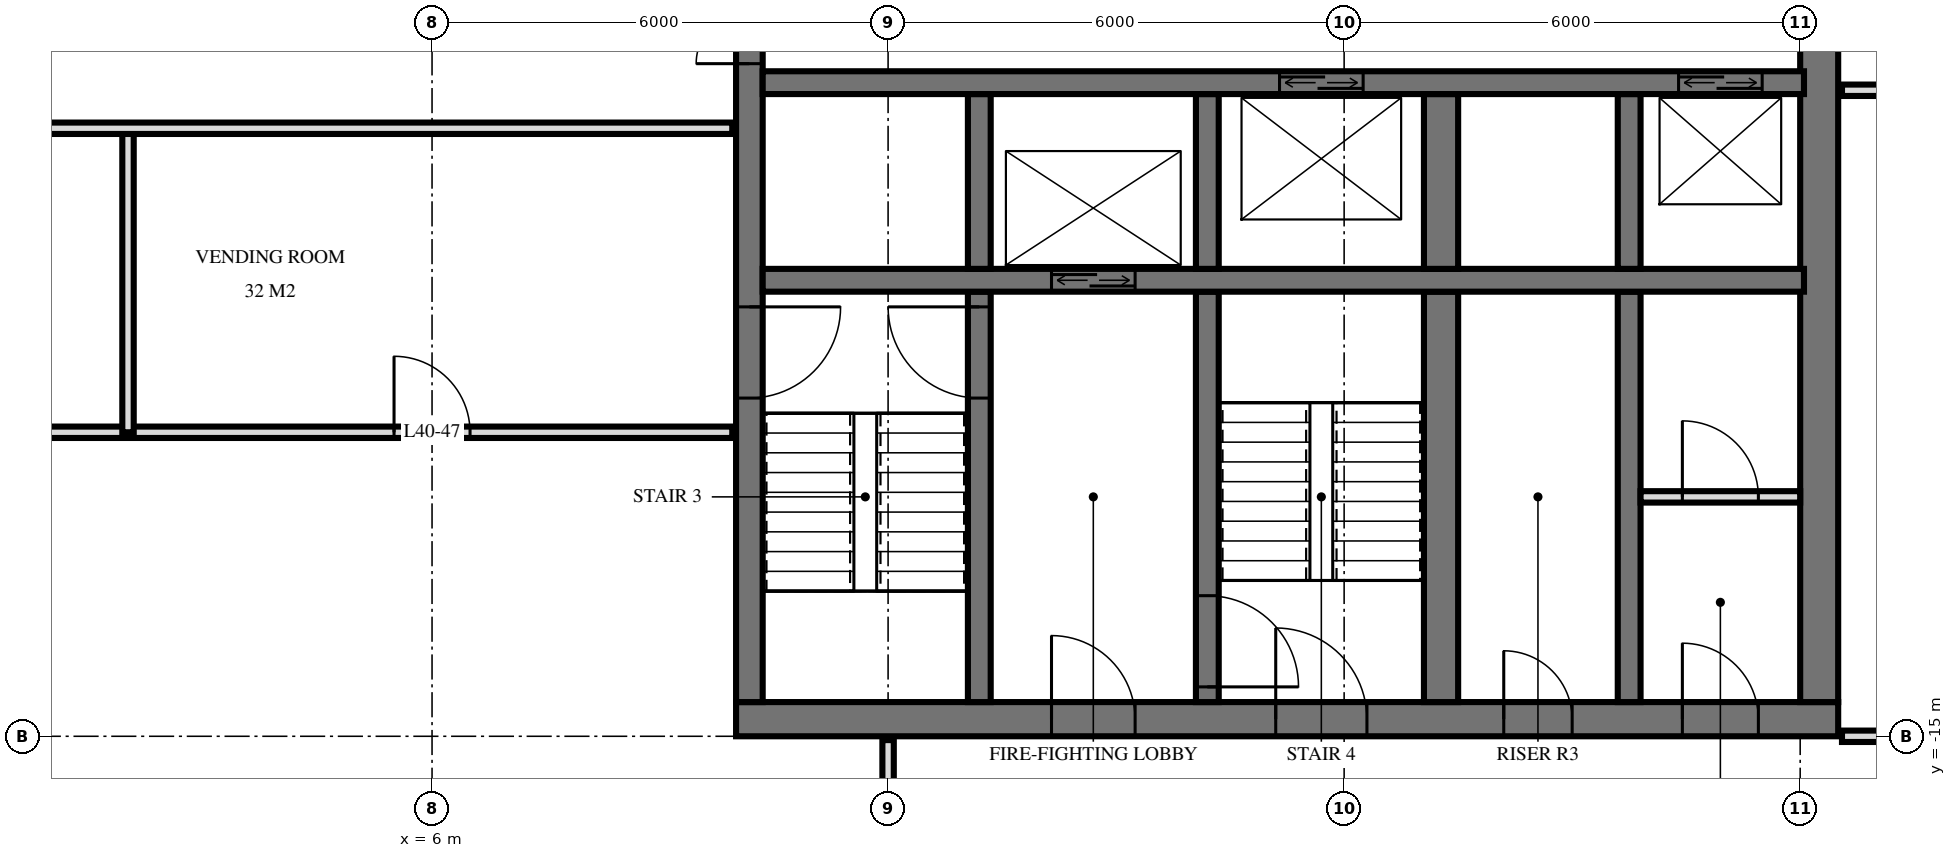
"""IFC4 building model, lengths in metres.
Left out: names, types, materials, properties, quantities, classifications, styles, units other than length and angle.
Written with IfcOpenShell. Run it as: python <this file> out.ifc"""

import sys

from ifc_helpers import new_model, si_unit, direction, frame, frame_2d, origin, place, context, subcontext, project, spatial, rectangle, extrude, element, fill, save


model = new_model("IFC4")
c1 = context("Model", 3, precision=1e-05, world=origin(), true_north=direction((0.0, 1.0)))
c2 = subcontext(c1, "Body", "Model", "MODEL_VIEW")
j1 = project(units=[si_unit("LENGTHUNIT", "METRE"), si_unit("PLANEANGLEUNIT", "RADIAN")], contexts=[c1])
p1 = place(None, origin())
s1 = spatial("IfcSite", under=j1, at=p1, CompositionType="ELEMENT")
p2 = place(p1, origin())
s2 = spatial("IfcBuilding", under=s1, at=p2, CompositionType="ELEMENT")
p3 = place(p2, frame((0.0, 0.0, 156.0)))
s3 = spatial("IfcBuildingStorey", under=s2, at=p3, CompositionType="ELEMENT", Elevation=156.0)
p4 = place(p3, frame((10.0, -14.775, 0.0), z_axis=(0.0, 0.0, 1.0), x_axis=(1.0, 0.0, 0.0)))
e1 = element("IfcWall", 1, at=p4, inside=s3, PredefinedType="SHEAR", context=c2, shape_type="SweptSolid", body=[
    extrude(rectangle(XDim=14.5, YDim=0.45, at=frame_2d((7.25, 0.0))), origin(), (0.0, 0.0, 1.0), 3.6),
])
p5 = place(p4, frame((7.1, 0.0, 0.0)))
e2 = element("IfcOpeningElement", 2, at=p5, cuts=e1, PredefinedType="OPENING", context=c2, shape_type="SweptSolid", body=[
    extrude(rectangle(XDim=1.2, YDim=2.1, at=frame_2d((0.6, 1.05))), frame((0.0, 0.235, 0.0), z_axis=(0.0, -1.0, 0.0), x_axis=(1.0, 0.0, 0.0)), (0.0, 0.0, 1.0), 0.47),
])
p6 = place(p4, frame((4.15, 0.0, 0.0)))
e3 = element("IfcOpeningElement", 3, at=p6, cuts=e1, PredefinedType="OPENING", context=c2, shape_type="SweptSolid", body=[
    extrude(rectangle(XDim=1.1, YDim=2.1, at=frame_2d((0.55, 1.05))), frame((0.0, 0.235, 0.0), z_axis=(0.0, -1.0, 0.0), x_axis=(1.0, 0.0, 0.0)), (0.0, 0.0, 1.0), 0.47),
])
p7 = place(p4, frame((10.1, 0.0, 0.0)))
e4 = element("IfcOpeningElement", 4, at=p7, cuts=e1, PredefinedType="OPENING", context=c2, shape_type="SweptSolid", body=[
    extrude(rectangle(XDim=0.9, YDim=2.1, at=frame_2d((0.45, 1.05))), frame((0.0, 0.235, 0.0), z_axis=(0.0, -1.0, 0.0), x_axis=(1.0, 0.0, 0.0)), (0.0, 0.0, 1.0), 0.47),
])
p8 = place(p4, frame((12.45, 0.0, 0.0)))
e5 = element("IfcOpeningElement", 5, at=p8, cuts=e1, PredefinedType="OPENING", context=c2, shape_type="SweptSolid", body=[
    extrude(rectangle(XDim=1.0, YDim=2.1, at=frame_2d((0.5, 1.05))), frame((0.0, 0.235, 0.0), z_axis=(0.0, -1.0, 0.0), x_axis=(1.0, 0.0, 0.0)), (0.0, 0.0, 1.0), 0.47),
])
p9 = place(p3, frame((10.175, -14.55, 0.0), z_axis=(0.0, 0.0, 1.0), x_axis=(0.0, 1.0, 0.0)))
e6 = element("IfcWall", 6, at=p9, inside=s3, PredefinedType="SHEAR", context=c2, shape_type="SweptSolid", body=[
    extrude(rectangle(XDim=14.1, YDim=0.35, at=frame_2d((7.05, 0.0))), origin(), (0.0, 0.0, 1.0), 3.6),
])
p10 = place(p9, frame((8.4, 0.0, 0.0)))
e7 = element("IfcOpeningElement", 7, at=p10, cuts=e6, PredefinedType="OPENING", context=c2, shape_type="SweptSolid", body=[
    extrude(rectangle(XDim=1.4, YDim=2.4, at=frame_2d((0.7, 1.2))), frame((0.0, 0.185, 0.0), z_axis=(0.0, -1.0, 0.0), x_axis=(1.0, 0.0, 0.0)), (0.0, 0.0, 1.0), 0.37),
])
p11 = place(p9, frame((10.0, 0.0, 0.0)))
e8 = element("IfcOpeningElement", 8, at=p11, cuts=e6, PredefinedType="OPENING", context=c2, shape_type="SweptSolid", body=[
    extrude(rectangle(XDim=1.4, YDim=2.4, at=frame_2d((0.7, 1.2))), frame((0.0, 0.185, 0.0), z_axis=(0.0, -1.0, 0.0), x_axis=(1.0, 0.0, 0.0)), (0.0, 0.0, 1.0), 0.37),
])
p12 = place(p9, frame((4.0, 0.0, 0.0)))
e9 = element("IfcOpeningElement", 9, at=p12, cuts=e6, PredefinedType="OPENING", context=c2, shape_type="SweptSolid", body=[
    extrude(rectangle(XDim=1.2, YDim=2.1, at=frame_2d((0.6, 1.05))), frame((0.0, 0.185, 0.0), z_axis=(0.0, -1.0, 0.0), x_axis=(1.0, 0.0, 0.0)), (0.0, 0.0, 1.0), 0.37),
])
p13 = place(p3, frame((24.25, -14.55, 0.0), z_axis=(0.0, 0.0, 1.0), x_axis=(0.0, 1.0, 0.0)))
e10 = element("IfcWall", 10, at=p13, inside=s3, PredefinedType="SHEAR", context=c2, shape_type="SweptSolid", body=[
    extrude(rectangle(XDim=14.1, YDim=0.5, at=frame_2d((7.05, 0.0))), origin(), (0.0, 0.0, 1.0), 3.6),
])
p14 = place(p3, frame((10.35, -6.4, 0.0), z_axis=(0.0, 0.0, 1.0), x_axis=(1.0, 0.0, 0.0)))
e11 = element("IfcWall", 11, at=p14, inside=s3, PredefinedType="SHEAR", context=c2, shape_type="SweptSolid", body=[
    extrude(rectangle(XDim=13.7, YDim=0.3, at=frame_2d((6.85, 0.0))), origin(), (0.0, 0.0, 1.0), 3.6),
])
p15 = place(p14, frame((12.05, 0.0, 0.0)))
e12 = element("IfcOpeningElement", 12, at=p15, cuts=e11, PredefinedType="OPENING", context=c2, shape_type="SweptSolid", body=[
    extrude(rectangle(XDim=1.1, YDim=2.1, at=frame_2d((0.55, 1.05))), frame((0.0, 0.16, 0.0), z_axis=(0.0, -1.0, 0.0), x_axis=(1.0, 0.0, 0.0)), (0.0, 0.0, 1.0), 0.32),
])
p16 = place(p14, frame((6.8, 0.0, 0.0)))
e13 = element("IfcOpeningElement", 13, at=p16, cuts=e11, PredefinedType="OPENING", context=c2, shape_type="SweptSolid", body=[
    extrude(rectangle(XDim=1.1, YDim=2.1, at=frame_2d((0.55, 1.05))), frame((0.0, 0.16, 0.0), z_axis=(0.0, -1.0, 0.0), x_axis=(1.0, 0.0, 0.0)), (0.0, 0.0, 1.0), 0.32),
])
p17 = place(p3, frame((10.35, -9.0, 0.0), z_axis=(0.0, 0.0, 1.0), x_axis=(1.0, 0.0, 0.0)))
e14 = element("IfcWall", 14, at=p17, inside=s3, PredefinedType="SHEAR", context=c2, shape_type="SweptSolid", body=[
    extrude(rectangle(XDim=13.7, YDim=0.3, at=frame_2d((6.85, 0.0))), origin(), (0.0, 0.0, 1.0), 3.6),
])
p18 = place(p17, frame((3.8, 0.0, 0.0)))
e15 = element("IfcOpeningElement", 15, at=p18, cuts=e14, PredefinedType="OPENING", context=c2, shape_type="SweptSolid", body=[
    extrude(rectangle(XDim=1.1, YDim=2.1, at=frame_2d((0.55, 1.05))), frame((0.0, 0.16, 0.0), z_axis=(0.0, -1.0, 0.0), x_axis=(1.0, 0.0, 0.0)), (0.0, 0.0, 1.0), 0.32),
])
p19 = place(p3, frame((13.2, -8.85, 0.0), z_axis=(0.0, 0.0, 1.0), x_axis=(0.0, 1.0, 0.0)))
e16 = element("IfcWall", 16, at=p19, inside=s3, PredefinedType="SHEAR", context=c2, shape_type="SweptSolid", body=[
    extrude(rectangle(XDim=2.3, YDim=0.3, at=frame_2d((1.15, 0.0))), origin(), (0.0, 0.0, 1.0), 3.6),
])
p20 = place(p3, frame((13.2, -14.55, 0.0), z_axis=(0.0, 0.0, 1.0), x_axis=(0.0, 1.0, 0.0)))
e17 = element("IfcWall", 17, at=p20, inside=s3, PredefinedType="SHEAR", context=c2, shape_type="SweptSolid", body=[
    extrude(rectangle(XDim=5.4, YDim=0.3, at=frame_2d((2.7, 0.0))), origin(), (0.0, 0.0, 1.0), 3.6),
])
p21 = place(p20, frame((4.0, 0.0, 0.0)))
e18 = element("IfcOpeningElement", 18, at=p21, cuts=e17, PredefinedType="OPENING", context=c2, shape_type="SweptSolid", body=[
    extrude(rectangle(XDim=1.2, YDim=2.1, at=frame_2d((0.6, 1.05))), frame((0.0, 0.16, 0.0), z_axis=(0.0, -1.0, 0.0), x_axis=(1.0, 0.0, 0.0)), (0.0, 0.0, 1.0), 0.32),
])
p22 = place(p3, frame((16.2, -8.85, 0.0), z_axis=(0.0, 0.0, 1.0), x_axis=(0.0, 1.0, 0.0)))
e19 = element("IfcWall", 19, at=p22, inside=s3, PredefinedType="SHEAR", context=c2, shape_type="SweptSolid", body=[
    extrude(rectangle(XDim=2.3, YDim=0.3, at=frame_2d((1.15, 0.0))), origin(), (0.0, 0.0, 1.0), 3.6),
])
p23 = place(p3, frame((16.2, -14.55, 0.0), z_axis=(0.0, 0.0, 1.0), x_axis=(0.0, 1.0, 0.0)))
e20 = element("IfcWall", 20, at=p23, inside=s3, PredefinedType="SHEAR", context=c2, shape_type="SweptSolid", body=[
    extrude(rectangle(XDim=5.4, YDim=0.3, at=frame_2d((2.7, 0.0))), origin(), (0.0, 0.0, 1.0), 3.6),
])
p24 = place(p23, frame((0.2, 0.0, 0.0)))
e21 = element("IfcOpeningElement", 21, at=p24, cuts=e20, PredefinedType="OPENING", context=c2, shape_type="SweptSolid", body=[
    extrude(rectangle(XDim=1.2, YDim=2.1, at=frame_2d((0.6, 1.05))), frame((0.0, 0.16, 0.0), z_axis=(0.0, -1.0, 0.0), x_axis=(1.0, 0.0, 0.0)), (0.0, 0.0, 1.0), 0.32),
])
p25 = place(p3, frame((19.275, -8.85, 0.0), z_axis=(0.0, 0.0, 1.0), x_axis=(0.0, 1.0, 0.0)))
e22 = element("IfcWall", 22, at=p25, inside=s3, PredefinedType="SHEAR", context=c2, shape_type="SweptSolid", body=[
    extrude(rectangle(XDim=2.3, YDim=0.45, at=frame_2d((1.15, 0.0))), origin(), (0.0, 0.0, 1.0), 3.6),
])
p26 = place(p3, frame((19.275, -14.55, 0.0), z_axis=(0.0, 0.0, 1.0), x_axis=(0.0, 1.0, 0.0)))
e23 = element("IfcWall", 23, at=p26, inside=s3, PredefinedType="SHEAR", context=c2, shape_type="SweptSolid", body=[
    extrude(rectangle(XDim=5.4, YDim=0.45, at=frame_2d((2.7, 0.0))), origin(), (0.0, 0.0, 1.0), 3.6),
])
p27 = place(p3, frame((21.75, -8.85, 0.0), z_axis=(0.0, 0.0, 1.0), x_axis=(0.0, 1.0, 0.0)))
e24 = element("IfcWall", 24, at=p27, inside=s3, PredefinedType="SHEAR", context=c2, shape_type="SweptSolid", body=[
    extrude(rectangle(XDim=2.3, YDim=0.3, at=frame_2d((1.15, 0.0))), origin(), (0.0, 0.0, 1.0), 3.6),
])
p28 = place(p3, frame((21.75, -14.55, 0.0), z_axis=(0.0, 0.0, 1.0), x_axis=(0.0, 1.0, 0.0)))
e25 = element("IfcWall", 25, at=p28, inside=s3, PredefinedType="SHEAR", context=c2, shape_type="SweptSolid", body=[
    extrude(rectangle(XDim=5.4, YDim=0.3, at=frame_2d((2.7, 0.0))), origin(), (0.0, 0.0, 1.0), 3.6),
])
p29 = place(p3, frame((21.9, -11.85, 0.0), z_axis=(0.0, 0.0, 1.0), x_axis=(1.0, 0.0, 0.0)))
e26 = element("IfcWall", 26, at=p29, inside=s3, PredefinedType="PARTITIONING", context=c2, shape_type="SweptSolid", body=[
    extrude(rectangle(XDim=2.1, YDim=0.15, at=frame_2d((1.05, 0.0))), origin(), (0.0, 0.0, 1.0), 3.3),
])
p30 = place(p29, frame((0.55, 0.0, 0.0)))
e27 = element("IfcOpeningElement", 27, at=p30, cuts=e26, PredefinedType="OPENING", context=c2, shape_type="SweptSolid", body=[
    extrude(rectangle(XDim=1.0, YDim=2.1, at=frame_2d((0.5, 1.05))), frame((0.0, 0.085, 0.0), z_axis=(0.0, -1.0, 0.0), x_axis=(1.0, 0.0, 0.0)), (0.0, 0.0, 1.0), 0.17),
])
p31 = place(p3, frame((12.0, -18.0, 0.0), z_axis=(0.0, 0.0, 1.0), x_axis=(0.0, 1.0, 0.0)))
e28 = element("IfcWall", 28, at=p31, inside=s3, PredefinedType="PARTITIONING", context=c2, shape_type="SweptSolid", body=[
    extrude(rectangle(XDim=2.95, YDim=0.15, at=frame_2d((1.475, 0.0))), origin(), (0.0, 0.0, 1.0), 3.32),
])
p32 = place(p31, frame((1.0, 0.0, 0.0)))
e29 = element("IfcOpeningElement", 29, at=p32, cuts=e28, PredefinedType="OPENING", context=c2, shape_type="SweptSolid", body=[
    extrude(rectangle(XDim=1.0, YDim=2.1, at=frame_2d((0.5, 1.05))), frame((0.0, 0.085, 0.0), z_axis=(0.0, -1.0, 0.0), x_axis=(1.0, 0.0, 0.0)), (0.0, 0.0, 1.0), 0.17),
])
p33 = place(p3, frame((2.0, -11.0, 0.0), z_axis=(0.0, 0.0, 1.0), x_axis=(0.0, 1.0, 0.0)))
e30 = element("IfcWall", 30, at=p33, inside=s3, PredefinedType="PARTITIONING", context=c2, shape_type="SweptSolid", body=[
    extrude(rectangle(XDim=4.0, YDim=0.15, at=frame_2d((2.0, 0.0))), origin(), (0.0, 0.0, 1.0), 3.32),
])
p34 = place(p3, frame((24.55, -15.0, 0.0), z_axis=(0.0, 0.0, 1.0), x_axis=(1.0, 0.0, 0.0)))
e31 = element("IfcWall", 31, at=p34, inside=s3, PredefinedType="PARTITIONING", context=c2, shape_type="SweptSolid", body=[
    extrude(rectangle(XDim=3.47, YDim=0.15, at=frame_2d((1.735, 0.0))), origin(), (0.0, 0.0, 1.0), 3.32),
])
p35 = place(p34, frame((0.9, 0.0, 0.0)))
e32 = element("IfcOpeningElement", 32, at=p35, cuts=e31, PredefinedType="OPENING", context=c2, shape_type="SweptSolid", body=[
    extrude(rectangle(XDim=1.0, YDim=2.1, at=frame_2d((0.5, 1.05))), frame((0.0, 0.085, 0.0), z_axis=(0.0, -1.0, 0.0), x_axis=(1.0, 0.0, 0.0)), (0.0, 0.0, 1.0), 0.17),
])
p36 = place(p3, frame((-9.95, -11.0, 0.0), z_axis=(0.0, 0.0, 1.0), x_axis=(1.0, 0.0, 0.0)))
e33 = element("IfcWall", 33, at=p36, inside=s3, PredefinedType="PARTITIONING", context=c2, shape_type="SweptSolid", body=[
    extrude(rectangle(XDim=19.9, YDim=0.15, at=frame_2d((9.95, 0.0))), origin(), (0.0, 0.0, 1.0), 3.32),
])
p37 = place(p36, frame((9.45, 0.0, 0.0)))
e34 = element("IfcOpeningElement", 34, at=p37, cuts=e33, PredefinedType="OPENING", context=c2, shape_type="SweptSolid", body=[
    extrude(rectangle(XDim=1.0, YDim=2.1, at=frame_2d((0.5, 1.05))), frame((0.0, 0.085, 0.0), z_axis=(0.0, -1.0, 0.0), x_axis=(1.0, 0.0, 0.0)), (0.0, 0.0, 1.0), 0.17),
])
p38 = place(p36, frame((15.45, 0.0, 0.0)))
e35 = element("IfcOpeningElement", 35, at=p38, cuts=e33, PredefinedType="OPENING", context=c2, shape_type="SweptSolid", body=[
    extrude(rectangle(XDim=1.0, YDim=2.1, at=frame_2d((0.5, 1.05))), frame((0.0, 0.085, 0.0), z_axis=(0.0, -1.0, 0.0), x_axis=(1.0, 0.0, 0.0)), (0.0, 0.0, 1.0), 0.17),
])
p39 = place(p3, frame((-9.95, -7.0, 0.0), z_axis=(0.0, 0.0, 1.0), x_axis=(1.0, 0.0, 0.0)))
e36 = element("IfcWall", 36, at=p39, inside=s3, PredefinedType="PARTITIONING", context=c2, shape_type="SweptSolid", body=[
    extrude(rectangle(XDim=19.9, YDim=0.15, at=frame_2d((9.95, 0.0))), origin(), (0.0, 0.0, 1.0), 3.32),
])
p40 = place(p39, frame((9.45, 0.0, 0.0)))
e37 = element("IfcOpeningElement", 37, at=p40, cuts=e36, PredefinedType="OPENING", context=c2, shape_type="SweptSolid", body=[
    extrude(rectangle(XDim=1.0, YDim=2.1, at=frame_2d((0.5, 1.05))), frame((0.0, 0.085, 0.0), z_axis=(0.0, -1.0, 0.0), x_axis=(1.0, 0.0, 0.0)), (0.0, 0.0, 1.0), 0.17),
])
p41 = place(p39, frame((3.45, 0.0, 0.0)))
e38 = element("IfcOpeningElement", 38, at=p41, cuts=e36, PredefinedType="OPENING", context=c2, shape_type="SweptSolid", body=[
    extrude(rectangle(XDim=1.0, YDim=2.1, at=frame_2d((0.5, 1.05))), frame((0.0, 0.085, 0.0), z_axis=(0.0, -1.0, 0.0), x_axis=(1.0, 0.0, 0.0)), (0.0, 0.0, 1.0), 0.17),
])
p42 = place(p3, frame((24.55, -6.5, 0.0), z_axis=(0.0, 0.0, 1.0), x_axis=(1.0, 0.0, 0.0)))
e39 = element("IfcWall", 39, at=p42, inside=s3, PredefinedType="PARTITIONING", context=c2, shape_type="SweptSolid", body=[
    extrude(rectangle(XDim=3.47, YDim=0.15, at=frame_2d((1.735, 0.0))), origin(), (0.0, 0.0, 1.0), 3.32),
])
p43 = place(p42, frame((1.35, 0.0, 0.0)))
e40 = element("IfcOpeningElement", 40, at=p43, cuts=e39, PredefinedType="OPENING", context=c2, shape_type="SweptSolid", body=[
    extrude(rectangle(XDim=0.9, YDim=2.1, at=frame_2d((0.45, 1.05))), frame((0.0, 0.085, 0.0), z_axis=(0.0, -1.0, 0.0), x_axis=(1.0, 0.0, 0.0)), (0.0, 0.0, 1.0), 0.17),
])
p44 = place(p15, origin())
e41 = element("IfcDoor", 41, at=p44, inside=s3, OperationType="DOUBLE_DOOR_SLIDING", PredefinedType="USERDEFINED", context=c2, shape_type="SweptSolid", body=[
    extrude(rectangle(XDim=1.1, YDim=2.1, at=frame_2d((0.55, 1.05))), frame((0.0, 0.025, 0.0), z_axis=(0.0, -1.0, 0.0), x_axis=(1.0, 0.0, 0.0)), (0.0, 0.0, 1.0), 0.05),
])
fill(e12, e41)
p45 = place(p18, origin())
e42 = element("IfcDoor", 42, at=p45, inside=s3, OperationType="DOUBLE_DOOR_SLIDING", PredefinedType="USERDEFINED", context=c2, shape_type="SweptSolid", body=[
    extrude(rectangle(XDim=1.1, YDim=2.1, at=frame_2d((0.55, 1.05))), frame((0.0, 0.025, 0.0), z_axis=(0.0, -1.0, 0.0), x_axis=(1.0, 0.0, 0.0)), (0.0, 0.0, 1.0), 0.05),
])
fill(e15, e42)
p46 = place(p16, origin())
e43 = element("IfcDoor", 43, at=p46, inside=s3, OperationType="DOUBLE_DOOR_SLIDING", PredefinedType="USERDEFINED", context=c2, shape_type="SweptSolid", body=[
    extrude(rectangle(XDim=1.1, YDim=2.1, at=frame_2d((0.55, 1.05))), frame((0.0, 0.025, 0.0), z_axis=(0.0, -1.0, 0.0), x_axis=(1.0, 0.0, 0.0)), (0.0, 0.0, 1.0), 0.05),
])
fill(e13, e43)
p47 = place(p10, origin())
e44 = element("IfcDoor", 44, at=p47, inside=s3, OperationType="DOUBLE_DOOR_SINGLE_SWING", PredefinedType="DOOR", context=c2, shape_type="SweptSolid", body=[
    extrude(rectangle(XDim=1.4, YDim=2.4, at=frame_2d((0.7, 1.2))), frame((0.0, 0.025, 0.0), z_axis=(0.0, -1.0, 0.0), x_axis=(1.0, 0.0, 0.0)), (0.0, 0.0, 1.0), 0.05),
])
fill(e7, e44)
p48 = place(p12, frame((0.6, 0.0, 0.0), z_axis=(0.0, 0.0, 1.0), x_axis=(-1.0, 0.0, 0.0)))
e45 = element("IfcDoor", 45, at=p48, inside=s3, OperationType="SINGLE_SWING_RIGHT", PredefinedType="DOOR", context=c2, shape_type="SweptSolid", body=[
    extrude(rectangle(XDim=1.2, YDim=2.1, at=frame_2d((0.0, 1.05))), frame((0.0, -0.025, 0.0), z_axis=(0.0, 1.0, 0.0), x_axis=(-1.0, 0.0, 0.0)), (0.0, 0.0, 1.0), 0.05),
])
fill(e9, e45)
p49 = place(p5, origin())
e46 = element("IfcDoor", 46, at=p49, inside=s3, OperationType="SINGLE_SWING_RIGHT", PredefinedType="DOOR", context=c2, shape_type="SweptSolid", body=[
    extrude(rectangle(XDim=1.2, YDim=2.1, at=frame_2d((0.6, 1.05))), frame((0.0, 0.025, 0.0), z_axis=(0.0, -1.0, 0.0), x_axis=(1.0, 0.0, 0.0)), (0.0, 0.0, 1.0), 0.05),
])
fill(e2, e46)
p50 = place(p6, origin())
e47 = element("IfcDoor", 47, at=p50, inside=s3, OperationType="SINGLE_SWING_RIGHT", PredefinedType="DOOR", context=c2, shape_type="SweptSolid", body=[
    extrude(rectangle(XDim=1.1, YDim=2.1, at=frame_2d((0.55, 1.05))), frame((0.0, 0.025, 0.0), z_axis=(0.0, -1.0, 0.0), x_axis=(1.0, 0.0, 0.0)), (0.0, 0.0, 1.0), 0.05),
])
fill(e3, e47)
p51 = place(p7, origin())
e48 = element("IfcDoor", 48, at=p51, inside=s3, OperationType="SINGLE_SWING_RIGHT", PredefinedType="DOOR", context=c2, shape_type="SweptSolid", body=[
    extrude(rectangle(XDim=0.9, YDim=2.1, at=frame_2d((0.45, 1.05))), frame((0.0, 0.025, 0.0), z_axis=(0.0, -1.0, 0.0), x_axis=(1.0, 0.0, 0.0)), (0.0, 0.0, 1.0), 0.05),
])
fill(e4, e48)
p52 = place(p8, origin())
e49 = element("IfcDoor", 49, at=p52, inside=s3, OperationType="SINGLE_SWING_RIGHT", PredefinedType="DOOR", context=c2, shape_type="SweptSolid", body=[
    extrude(rectangle(XDim=1.0, YDim=2.1, at=frame_2d((0.5, 1.05))), frame((0.0, 0.025, 0.0), z_axis=(0.0, -1.0, 0.0), x_axis=(1.0, 0.0, 0.0)), (0.0, 0.0, 1.0), 0.05),
])
fill(e5, e49)
p53 = place(p21, origin())
e50 = element("IfcDoor", 50, at=p53, inside=s3, OperationType="SINGLE_SWING_LEFT", PredefinedType="DOOR", context=c2, shape_type="SweptSolid", body=[
    extrude(rectangle(XDim=1.2, YDim=2.1, at=frame_2d((0.6, 1.05))), frame((0.0, 0.025, 0.0), z_axis=(0.0, -1.0, 0.0), x_axis=(1.0, 0.0, 0.0)), (0.0, 0.0, 1.0), 0.05),
])
fill(e18, e50)
p54 = place(p24, frame((0.6, 0.0, 0.0), z_axis=(0.0, 0.0, 1.0), x_axis=(-1.0, 0.0, 0.0)))
e51 = element("IfcDoor", 51, at=p54, inside=s3, OperationType="SINGLE_SWING_LEFT", PredefinedType="DOOR", context=c2, shape_type="SweptSolid", body=[
    extrude(rectangle(XDim=1.2, YDim=2.1, at=frame_2d((0.0, 1.05))), frame((0.0, -0.025, 0.0), z_axis=(0.0, 1.0, 0.0), x_axis=(-1.0, 0.0, 0.0)), (0.0, 0.0, 1.0), 0.05),
])
fill(e21, e51)
p55 = place(p30, origin())
e52 = element("IfcDoor", 52, at=p55, inside=s3, OperationType="SINGLE_SWING_RIGHT", PredefinedType="DOOR", context=c2, shape_type="SweptSolid", body=[
    extrude(rectangle(XDim=1.0, YDim=2.1, at=frame_2d((0.5, 1.05))), frame((0.0, 0.025, 0.0), z_axis=(0.0, -1.0, 0.0), x_axis=(1.0, 0.0, 0.0)), (0.0, 0.0, 1.0), 0.05),
])
fill(e27, e52)
p56 = place(p38, origin())
e53 = element("IfcDoor", 53, at=p56, inside=s3, OperationType="SINGLE_SWING_RIGHT", PredefinedType="DOOR", context=c2, shape_type="SweptSolid", body=[
    extrude(rectangle(XDim=1.0, YDim=2.1, at=frame_2d((0.5, 1.05))), frame((0.0, 0.025, 0.0), z_axis=(0.0, -1.0, 0.0), x_axis=(1.0, 0.0, 0.0)), (0.0, 0.0, 1.0), 0.05),
])
fill(e35, e53)
save(model, sys.argv[1])
